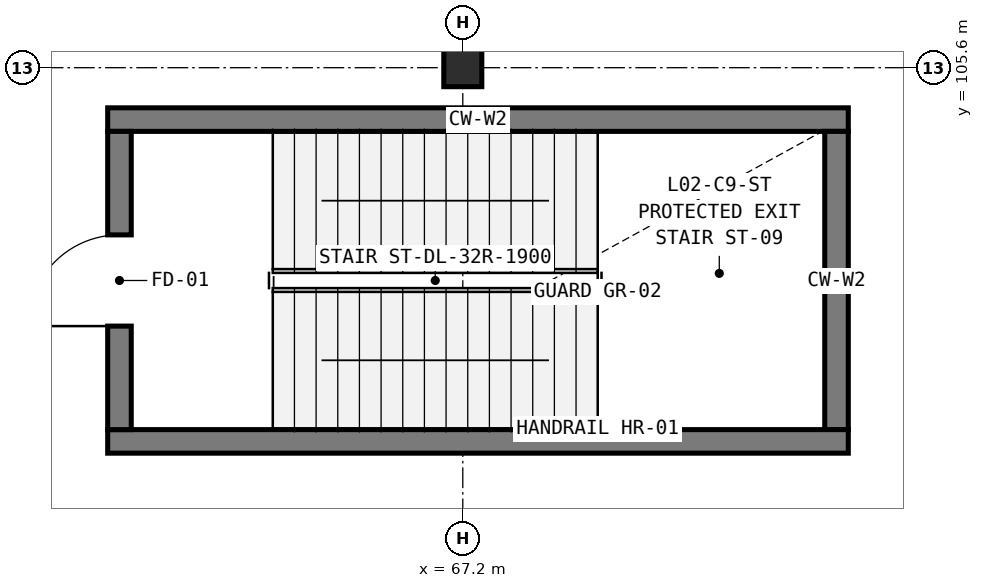
"""IFC4 building model, lengths in metres.
Left out: names, types, materials, properties, quantities, classifications, styles, units other than length and angle.
Written with IfcOpenShell. Run it as: python <this file> out.ifc"""

import sys

from ifc_helpers import new_model, si_unit, direction, frame, frame_2d, origin, origin_2d, place, context, subcontext, project, spatial, rectangle, extrude, element, fill, save


model = new_model("IFC4")
c1 = context("Model", 3, precision=1e-05, world=origin(), true_north=direction((0.0, 1.0)))
c2 = subcontext(c1, "Body", "Model", "MODEL_VIEW")
j1 = project(units=[si_unit("LENGTHUNIT", "METRE"), si_unit("PLANEANGLEUNIT", "RADIAN")], contexts=[c1])
p1 = place(None, origin())
s1 = spatial("IfcSite", under=j1, at=p1, CompositionType="ELEMENT")
p2 = place(p1, origin())
s2 = spatial("IfcBuilding", under=s1, at=p2, CompositionType="ELEMENT")
p3 = place(p2, frame((0.0, 0.0, 11.4)))
s3 = spatial("IfcBuildingStorey", under=s2, at=p3, CompositionType="ELEMENT", Elevation=11.4)
p4 = place(p3, frame((67.2, 105.6, 0.0), z_axis=(0.0, 0.0, 1.0), x_axis=(1.0, 0.0, 0.0)))
e1 = element("IfcColumn", 1, at=p4, inside=s3, PredefinedType="COLUMN", context=c2, shape_type="SweptSolid", body=[
    extrude(rectangle(XDim=0.5, YDim=0.5, at=origin_2d()), origin(), (0.0, 0.0, 1.0), 5.4),
])
p5 = place(p3, frame((62.528, 104.917, 0.0), z_axis=(0.0, 0.0, 1.0), x_axis=(1.0, 0.0, 0.0)))
e2 = element("IfcWall", 2, at=p5, inside=s3, PredefinedType="SHEAR", context=c2, shape_type="SweptSolid", body=[
    extrude(rectangle(XDim=9.744, YDim=0.31, at=frame_2d((4.872, 0.0))), origin(), (0.0, 0.0, 1.0), 5.1),
])
p6 = place(p3, frame((72.117, 104.762, 0.0), z_axis=(0.0, 0.0, 1.0), x_axis=(0.0, -1.0, 0.0)))
e3 = element("IfcWall", 3, at=p6, inside=s3, PredefinedType="SHEAR", context=c2, shape_type="SweptSolid", body=[
    extrude(rectangle(XDim=3.924, YDim=0.31, at=frame_2d((1.962, 0.0))), origin(), (0.0, 0.0, 1.0), 5.1),
])
p7 = place(p3, frame((72.272, 100.683, 0.0), z_axis=(0.0, 0.0, 1.0), x_axis=(-1.0, 0.0, 0.0)))
e4 = element("IfcWall", 4, at=p7, inside=s3, PredefinedType="SHEAR", context=c2, shape_type="SweptSolid", body=[
    extrude(rectangle(XDim=9.744, YDim=0.31, at=frame_2d((4.872, 0.0))), origin(), (0.0, 0.0, 1.0), 5.1),
])
p8 = place(p3, frame((62.683, 100.838, 0.0), z_axis=(0.0, 0.0, 1.0), x_axis=(0.0, 1.0, 0.0)))
e5 = element("IfcWall", 5, at=p8, inside=s3, PredefinedType="SHEAR", context=c2, shape_type="SweptSolid", body=[
    extrude(rectangle(XDim=3.924, YDim=0.31, at=frame_2d((1.962, 0.0))), origin(), (0.0, 0.0, 1.0), 5.1),
])
p9 = place(p8, frame((1.362, 0.0, 0.0)))
e6 = element("IfcOpeningElement", 6, at=p9, cuts=e5, PredefinedType="OPENING", context=c2, shape_type="SweptSolid", body=[
    extrude(rectangle(XDim=1.2, YDim=2.2, at=frame_2d((0.6, 1.1))), frame((0.0, 0.165, 0.0), z_axis=(0.0, -1.0, 0.0), x_axis=(1.0, 0.0, 0.0)), (0.0, 0.0, 1.0), 0.33),
])
p10 = place(p9, origin())
e7 = element("IfcDoor", 7, at=p10, inside=s3, OperationType="SINGLE_SWING_LEFT", PredefinedType="DOOR", context=c2, shape_type="SweptSolid", body=[
    extrude(rectangle(XDim=1.2, YDim=2.2, at=frame_2d((0.6, 1.1))), frame((0.0, 0.025, 0.0), z_axis=(0.0, -1.0, 0.0), x_axis=(1.0, 0.0, 0.0)), (0.0, 0.0, 1.0), 0.05),
])
fill(e6, e7)
save(model, sys.argv[1])
